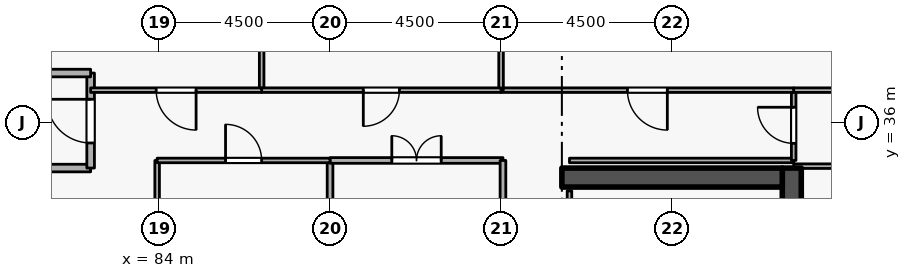
"""IFC4 building model, lengths in metres.
Left out: names, types, materials, properties, quantities, classifications, styles, units other than length and angle.
Written with IfcOpenShell. Run it as: python <this file> out.ifc"""

import sys

from ifc_helpers import new_model, si_unit, direction, frame, frame_2d, origin, place, context, subcontext, project, spatial, rectangle, extrude, element, fill, save


model = new_model("IFC4")
c1 = context("Model", 3, precision=1e-05, world=origin(), true_north=direction((0.0, 1.0)))
c2 = subcontext(c1, "Body", "Model", "MODEL_VIEW")
j1 = project(units=[si_unit("LENGTHUNIT", "METRE"), si_unit("PLANEANGLEUNIT", "RADIAN")], contexts=[c1])
p1 = place(None, origin())
s1 = spatial("IfcSite", under=j1, at=p1, CompositionType="ELEMENT")
p2 = place(p1, origin())
s2 = spatial("IfcBuilding", under=s1, at=p2, CompositionType="ELEMENT")
p3 = place(p2, frame((0.0, 0.0, 243.9)))
s3 = spatial("IfcBuildingStorey", under=s2, at=p3, CompositionType="ELEMENT", Elevation=243.9)
p4 = place(p3, frame((100.65, 19.2, 0.0), z_axis=(0.0, 0.0, 1.0), x_axis=(0.0, 1.0, 0.0)))
e1 = element("IfcWall", 1, at=p4, inside=s3, PredefinedType="SHEAR", context=c2, shape_type="SweptSolid", body=[
    extrude(rectangle(XDim=15.6, YDim=0.5, at=frame_2d((7.8, 0.0))), origin(), (0.0, 0.0, 1.0), 3.6),
])
p5 = place(p3, frame((94.6, 34.55, 0.0), z_axis=(0.0, 0.0, 1.0), x_axis=(1.0, 0.0, 0.0)))
e2 = element("IfcWall", 2, at=p5, inside=s3, PredefinedType="SHEAR", context=c2, shape_type="SweptSolid", body=[
    extrude(rectangle(XDim=5.8, YDim=0.5, at=frame_2d((2.9, 0.0))), origin(), (0.0, 0.0, 1.0), 3.6),
])
p6 = place(p3, frame((79.9, 34.8, 0.0), z_axis=(0.0, 0.0, 1.0), x_axis=(1.0, 0.0, 0.0)))
e3 = element("IfcWall", 3, at=p6, inside=s3, PredefinedType="STANDARD", context=c2, shape_type="SweptSolid", body=[
    extrude(rectangle(XDim=2.3, YDim=0.2, at=frame_2d((1.15, 0.0))), origin(), (0.0, 0.0, 1.0), 2.545),
])
p7 = place(p3, frame((82.2, 34.8, 0.0), z_axis=(0.0, 0.0, 1.0), x_axis=(0.0, 1.0, 0.0)))
e4 = element("IfcWall", 4, at=p7, inside=s3, PredefinedType="STANDARD", context=c2, shape_type="SweptSolid", body=[
    extrude(rectangle(XDim=2.5, YDim=0.2, at=frame_2d((1.25, 0.0))), origin(), (0.0, 0.0, 1.0), 3.34),
])
p8 = place(p7, frame((0.66, 0.0, 0.0)))
e5 = element("IfcOpeningElement", 5, at=p8, cuts=e4, PredefinedType="OPENING", context=c2, shape_type="SweptSolid", body=[
    extrude(rectangle(XDim=1.15, YDim=2.1, at=frame_2d((0.575, 1.05))), frame((0.0, 0.11, 0.0), z_axis=(0.0, -1.0, 0.0), x_axis=(1.0, 0.0, 0.0)), (0.0, 0.0, 1.0), 0.22),
])
p9 = place(p3, frame((82.2, 37.3, 0.0), z_axis=(0.0, 0.0, 1.0), x_axis=(-1.0, 0.0, 0.0)))
e6 = element("IfcWall", 6, at=p9, inside=s3, PredefinedType="STANDARD", context=c2, shape_type="SweptSolid", body=[
    extrude(rectangle(XDim=5.7, YDim=0.2, at=frame_2d((2.85, 0.0))), origin(), (0.0, 0.0, 1.0), 3.34),
])
p10 = place(p3, frame((94.8, 32.1, 0.0), z_axis=(0.0, 0.0, 1.0), x_axis=(0.0, 1.0, 0.0)))
e7 = element("IfcWall", 7, at=p10, inside=s3, PredefinedType="PARTITIONING", context=c2, shape_type="SweptSolid", body=[
    extrude(rectangle(XDim=2.1, YDim=0.12, at=frame_2d((1.05, 0.0))), origin(), (0.0, 0.0, 1.0), 3.34),
])
p11 = place(p10, frame((0.575, 0.0, 0.0)))
e8 = element("IfcOpeningElement", 8, at=p11, cuts=e7, PredefinedType="OPENING", context=c2, shape_type="SweptSolid", body=[
    extrude(rectangle(XDim=0.95, YDim=2.1, at=frame_2d((0.475, 1.05))), frame((0.0, 0.07, 0.0), z_axis=(0.0, -1.0, 0.0), x_axis=(1.0, 0.0, 0.0)), (0.0, 0.0, 1.0), 0.14),
])
p12 = place(p3, frame((94.8, 35.0, 0.0), z_axis=(0.0, 0.0, 1.0), x_axis=(1.0, 0.0, 0.0)))
e9 = element("IfcWall", 9, at=p12, inside=s3, PredefinedType="PARTITIONING", context=c2, shape_type="SweptSolid", body=[
    extrude(rectangle(XDim=5.9, YDim=0.12, at=frame_2d((2.95, 0.0))), origin(), (0.0, 0.0, 1.0), 3.34),
])
p13 = place(p3, frame((100.7, 35.0, 0.0), z_axis=(0.0, 0.0, 1.0), x_axis=(0.0, 1.0, 0.0)))
e10 = element("IfcWall", 10, at=p13, inside=s3, PredefinedType="PARTITIONING", context=c2, shape_type="SweptSolid", body=[
    extrude(rectangle(XDim=1.85, YDim=0.12, at=frame_2d((0.925, 0.0))), origin(), (0.0, 0.0, 1.0), 3.34),
])
p14 = place(p13, frame((0.45, 0.0, 0.0)))
e11 = element("IfcOpeningElement", 11, at=p14, cuts=e10, PredefinedType="OPENING", context=c2, shape_type="SweptSolid", body=[
    extrude(rectangle(XDim=0.95, YDim=2.1, at=frame_2d((0.475, 1.05))), frame((0.0, 0.07, 0.0), z_axis=(0.0, -1.0, 0.0), x_axis=(1.0, 0.0, 0.0)), (0.0, 0.0, 1.0), 0.14),
])
for number, where, z_axis, x_axis in (
    (12, (100.7, 36.85, 0.0), (0.0, 0.0, 1.0), (1.0, 0.0, 0.0)),
    (13, (112.22, 34.85, 0.0), (0.0, 0.0, 1.0), (-1.0, 0.0, 0.0)),
):
    element("IfcWall", number, at=place(p3, frame(where, z_axis=z_axis, x_axis=x_axis)), inside=s3, PredefinedType="PARTITIONING", context=c2, shape_type="SweptSolid", body=[
        extrude(rectangle(XDim=11.52, YDim=0.12, at=frame_2d((5.76, 0.0))), origin(), (0.0, 0.0, 1.0), 3.34),
    ])
p15 = place(p3, frame((100.7, 36.85, 0.0), z_axis=(0.0, 0.0, 1.0), x_axis=(-1.0, 0.0, 0.0)))
e14 = element("IfcWall", 14, at=p15, inside=s3, PredefinedType="PARTITIONING", context=c2, shape_type="SweptSolid", body=[
    extrude(rectangle(XDim=7.7, YDim=0.12, at=frame_2d((3.85, 0.0))), origin(), (0.0, 0.0, 1.0), 3.34),
])
p16 = place(p15, frame((3.325, 0.0, 0.0)))
e15 = element("IfcOpeningElement", 15, at=p16, cuts=e14, PredefinedType="OPENING", context=c2, shape_type="SweptSolid", body=[
    extrude(rectangle(XDim=1.05, YDim=2.1, at=frame_2d((0.525, 1.05))), frame((0.0, 0.07, 0.0), z_axis=(0.0, -1.0, 0.0), x_axis=(1.0, 0.0, 0.0)), (0.0, 0.0, 1.0), 0.14),
])
for number, where, z_axis, x_axis in (
    (16, (93.0, 36.85, 0.0), (0.0, 0.0, 1.0), (0.0, 1.0, 0.0)),
    (17, (86.7, 36.85, 0.0), (0.0, 0.0, 1.0), (0.0, 1.0, 0.0)),
):
    element("IfcWall", number, at=place(p3, frame(where, z_axis=z_axis, x_axis=x_axis)), inside=s3, PredefinedType="PARTITIONING", context=c2, shape_type="SweptSolid", body=[
        extrude(rectangle(XDim=7.87, YDim=0.12, at=frame_2d((3.935, 0.0))), origin(), (0.0, 0.0, 1.0), 3.34),
    ])
p17 = place(p3, frame((93.0, 36.85, 0.0), z_axis=(0.0, 0.0, 1.0), x_axis=(-1.0, 0.0, 0.0)))
e18 = element("IfcWall", 18, at=p17, inside=s3, PredefinedType="PARTITIONING", context=c2, shape_type="SweptSolid", body=[
    extrude(rectangle(XDim=6.3, YDim=0.12, at=frame_2d((3.15, 0.0))), origin(), (0.0, 0.0, 1.0), 3.34),
])
p18 = place(p17, frame((2.675, 0.0, 0.0)))
e19 = element("IfcOpeningElement", 19, at=p18, cuts=e18, PredefinedType="OPENING", context=c2, shape_type="SweptSolid", body=[
    extrude(rectangle(XDim=0.95, YDim=2.1, at=frame_2d((0.475, 1.05))), frame((0.0, 0.07, 0.0), z_axis=(0.0, -1.0, 0.0), x_axis=(1.0, 0.0, 0.0)), (0.0, 0.0, 1.0), 0.14),
])
p19 = place(p3, frame((86.7, 36.85, 0.0), z_axis=(0.0, 0.0, 1.0), x_axis=(-1.0, 0.0, 0.0)))
e20 = element("IfcWall", 20, at=p19, inside=s3, PredefinedType="PARTITIONING", context=c2, shape_type="SweptSolid", body=[
    extrude(rectangle(XDim=4.5, YDim=0.12, at=frame_2d((2.25, 0.0))), origin(), (0.0, 0.0, 1.0), 3.34),
])
p20 = place(p19, frame((1.725, 0.0, 0.0)))
e21 = element("IfcOpeningElement", 21, at=p20, cuts=e20, PredefinedType="OPENING", context=c2, shape_type="SweptSolid", body=[
    extrude(rectangle(XDim=1.05, YDim=2.1, at=frame_2d((0.525, 1.05))), frame((0.0, 0.07, 0.0), z_axis=(0.0, -1.0, 0.0), x_axis=(1.0, 0.0, 0.0)), (0.0, 0.0, 1.0), 0.14),
])
p21 = place(p3, frame((88.5, 32.2, 0.0), z_axis=(0.0, 0.0, 1.0), x_axis=(0.0, 1.0, 0.0)))
e22 = element("IfcWall", 22, at=p21, inside=s3, PredefinedType="PARTITIONING", context=c2, shape_type="SweptSolid", body=[
    extrude(rectangle(XDim=2.8, YDim=0.15, at=frame_2d((1.4, 0.0))), origin(), (0.0, 0.0, 1.0), 2.878),
])
p22 = place(p3, frame((88.5, 35.0, 0.0), z_axis=(0.0, 0.0, 1.0), x_axis=(1.0, 0.0, 0.0)))
e23 = element("IfcWall", 23, at=p22, inside=s3, PredefinedType="PARTITIONING", context=c2, shape_type="SweptSolid", body=[
    extrude(rectangle(XDim=4.55, YDim=0.15, at=frame_2d((2.275, 0.0))), origin(), (0.0, 0.0, 1.0), 3.34),
])
p23 = place(p22, frame((1.625, 0.0, 0.0)))
e24 = element("IfcOpeningElement", 24, at=p23, cuts=e23, PredefinedType="OPENING", context=c2, shape_type="SweptSolid", body=[
    extrude(rectangle(XDim=1.3, YDim=2.12, at=frame_2d((0.65, 1.06))), frame((0.0, 0.085, 0.0), z_axis=(0.0, -1.0, 0.0), x_axis=(1.0, 0.0, 0.0)), (0.0, 0.0, 1.0), 0.17),
])
p24 = place(p3, frame((93.05, 35.0, 0.0), z_axis=(0.0, 0.0, 1.0), x_axis=(0.0, -1.0, 0.0)))
e25 = element("IfcWall", 25, at=p24, inside=s3, PredefinedType="PARTITIONING", context=c2, shape_type="SweptSolid", body=[
    extrude(rectangle(XDim=2.8, YDim=0.15, at=frame_2d((1.4, 0.0))), origin(), (0.0, 0.0, 1.0), 3.34),
])
p25 = place(p3, frame((83.95, 32.2, 0.0), z_axis=(0.0, 0.0, 1.0), x_axis=(0.0, 1.0, 0.0)))
e26 = element("IfcWall", 26, at=p25, inside=s3, PredefinedType="PARTITIONING", context=c2, shape_type="SweptSolid", body=[
    extrude(rectangle(XDim=2.8, YDim=0.12, at=frame_2d((1.4, 0.0))), origin(), (0.0, 0.0, 1.0), 3.34),
])
p26 = place(p3, frame((83.95, 35.0, 0.0), z_axis=(0.0, 0.0, 1.0), x_axis=(1.0, 0.0, 0.0)))
e27 = element("IfcWall", 27, at=p26, inside=s3, PredefinedType="PARTITIONING", context=c2, shape_type="SweptSolid", body=[
    extrude(rectangle(XDim=4.55, YDim=0.12, at=frame_2d((2.275, 0.0))), origin(), (0.0, 0.0, 1.0), 3.34),
])
p27 = place(p26, frame((1.8, 0.0, 0.0)))
e28 = element("IfcOpeningElement", 28, at=p27, cuts=e27, PredefinedType="OPENING", context=c2, shape_type="SweptSolid", body=[
    extrude(rectangle(XDim=0.95, YDim=2.1, at=frame_2d((0.475, 1.05))), frame((0.0, 0.07, 0.0), z_axis=(0.0, -1.0, 0.0), x_axis=(1.0, 0.0, 0.0)), (0.0, 0.0, 1.0), 0.14),
])
p28 = place(p8, origin())
e29 = element("IfcDoor", 29, at=p28, inside=s3, OperationType="SINGLE_SWING_RIGHT", PredefinedType="DOOR", context=c2, shape_type="SweptSolid", body=[
    extrude(rectangle(XDim=1.15, YDim=2.1, at=frame_2d((0.575, 1.05))), frame((0.0, 0.025, 0.0), z_axis=(0.0, -1.0, 0.0), x_axis=(1.0, 0.0, 0.0)), (0.0, 0.0, 1.0), 0.05),
])
fill(e5, e29)
p29 = place(p14, origin())
e30 = element("IfcDoor", 30, at=p29, inside=s3, OperationType="SINGLE_SWING_RIGHT", PredefinedType="DOOR", context=c2, shape_type="SweptSolid", body=[
    extrude(rectangle(XDim=0.95, YDim=2.1, at=frame_2d((0.475, 1.05))), frame((0.0, 0.025, 0.0), z_axis=(0.0, -1.0, 0.0), x_axis=(1.0, 0.0, 0.0)), (0.0, 0.0, 1.0), 0.05),
])
fill(e11, e30)
p30 = place(p16, origin())
e31 = element("IfcDoor", 31, at=p30, inside=s3, OperationType="SINGLE_SWING_LEFT", PredefinedType="DOOR", context=c2, shape_type="SweptSolid", body=[
    extrude(rectangle(XDim=1.05, YDim=2.1, at=frame_2d((0.525, 1.05))), frame((0.0, 0.025, 0.0), z_axis=(0.0, -1.0, 0.0), x_axis=(1.0, 0.0, 0.0)), (0.0, 0.0, 1.0), 0.05),
])
fill(e15, e31)
p31 = place(p18, origin())
e32 = element("IfcDoor", 32, at=p31, inside=s3, OperationType="SINGLE_SWING_RIGHT", PredefinedType="DOOR", context=c2, shape_type="SweptSolid", body=[
    extrude(rectangle(XDim=0.95, YDim=2.1, at=frame_2d((0.475, 1.05))), frame((0.0, 0.025, 0.0), z_axis=(0.0, -1.0, 0.0), x_axis=(1.0, 0.0, 0.0)), (0.0, 0.0, 1.0), 0.05),
])
fill(e19, e32)
p32 = place(p20, origin())
e33 = element("IfcDoor", 33, at=p32, inside=s3, OperationType="SINGLE_SWING_LEFT", PredefinedType="DOOR", context=c2, shape_type="SweptSolid", body=[
    extrude(rectangle(XDim=1.05, YDim=2.1, at=frame_2d((0.525, 1.05))), frame((0.0, 0.025, 0.0), z_axis=(0.0, -1.0, 0.0), x_axis=(1.0, 0.0, 0.0)), (0.0, 0.0, 1.0), 0.05),
])
fill(e21, e33)
p33 = place(p23, origin())
e34 = element("IfcDoor", 34, at=p33, inside=s3, OperationType="DOUBLE_DOOR_SINGLE_SWING", PredefinedType="DOOR", context=c2, shape_type="SweptSolid", body=[
    extrude(rectangle(XDim=1.3, YDim=2.12, at=frame_2d((0.65, 1.06))), frame((0.0, 0.025, 0.0), z_axis=(0.0, -1.0, 0.0), x_axis=(1.0, 0.0, 0.0)), (0.0, 0.0, 1.0), 0.05),
])
fill(e24, e34)
p34 = place(p27, origin())
e35 = element("IfcDoor", 35, at=p34, inside=s3, OperationType="SINGLE_SWING_LEFT", PredefinedType="DOOR", context=c2, shape_type="SweptSolid", body=[
    extrude(rectangle(XDim=0.95, YDim=2.1, at=frame_2d((0.475, 1.05))), frame((0.0, 0.025, 0.0), z_axis=(0.0, -1.0, 0.0), x_axis=(1.0, 0.0, 0.0)), (0.0, 0.0, 1.0), 0.05),
])
fill(e28, e35)
save(model, sys.argv[1])
